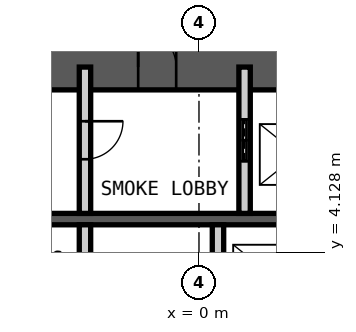
"""IFC4 building model, lengths in metres.
Left out: names, types, materials, properties, quantities, classifications, styles, units other than length and angle.
Written with IfcOpenShell. Run it as: python <this file> out.ifc"""

import sys

from ifc_helpers import new_model, si_unit, direction, frame, frame_2d, origin, place, context, subcontext, project, spatial, rectangle, extrude, element, fill, save


model = new_model("IFC4")
c1 = context("Model", 3, precision=1e-05, world=origin(), true_north=direction((0.0, 1.0)))
c2 = subcontext(c1, "Body", "Model", "MODEL_VIEW")
j1 = project(units=[si_unit("LENGTHUNIT", "METRE"), si_unit("PLANEANGLEUNIT", "RADIAN")], contexts=[c1])
p1 = place(None, origin())
s1 = spatial("IfcSite", under=j1, at=p1, CompositionType="ELEMENT")
p2 = place(p1, origin())
s2 = spatial("IfcBuilding", under=s1, at=p2, CompositionType="ELEMENT")
p3 = place(p2, frame((0.0, 0.0, 256.0)))
s3 = spatial("IfcBuildingStorey", under=s2, at=p3, CompositionType="ELEMENT", Elevation=256.0)
p4 = place(p3, frame((-12.0, 9.0, 0.0), z_axis=(0.0, 0.0, 1.0), x_axis=(1.0, 0.0, 0.0)))
e1 = element("IfcWall", 1, at=p4, inside=s3, PredefinedType="SHEAR", context=c2, shape_type="SweptSolid", body=[
    extrude(rectangle(XDim=24.0, YDim=1.2, at=frame_2d((12.0, 0.0))), origin(), (0.0, 0.0, 1.0), 6.0),
])
p5 = place(p4, frame((10.4, 0.0, 0.0)))
e2 = element("IfcOpeningElement", 2, at=p5, cuts=e1, PredefinedType="OPENING", context=c2, shape_type="SweptSolid", body=[
    extrude(rectangle(XDim=1.0, YDim=2.1, at=frame_2d((0.5, 1.05))), frame((0.0, 0.61, 0.0), z_axis=(0.0, -1.0, 0.0), x_axis=(1.0, 0.0, 0.0)), (0.0, 0.0, 1.0), 1.22),
])
p6 = place(p4, frame((17.6, 0.0, 0.0)))
e3 = element("IfcOpeningElement", 3, at=p6, cuts=e1, PredefinedType="OPENING", context=c2, shape_type="SweptSolid", body=[
    extrude(rectangle(XDim=0.9, YDim=2.1, at=frame_2d((0.45, 1.05))), frame((0.0, 0.61, 0.0), z_axis=(0.0, -1.0, 0.0), x_axis=(1.0, 0.0, 0.0)), (0.0, 0.0, 1.0), 1.22),
])
p7 = place(p4, frame((21.9, 0.0, 0.0)))
e4 = element("IfcOpeningElement", 4, at=p7, cuts=e1, PredefinedType="OPENING", context=c2, shape_type="SweptSolid", body=[
    extrude(rectangle(XDim=0.9, YDim=2.1, at=frame_2d((0.45, 1.05))), frame((0.0, 0.61, 0.0), z_axis=(0.0, -1.0, 0.0), x_axis=(1.0, 0.0, 0.0)), (0.0, 0.0, 1.0), 1.22),
])
p8 = place(p3, frame((-12.0, 5.0, 0.0), z_axis=(0.0, 0.0, 1.0), x_axis=(1.0, 0.0, 0.0)))
e5 = element("IfcWall", 5, at=p8, inside=s3, PredefinedType="SHEAR", context=c2, shape_type="SweptSolid", body=[
    extrude(rectangle(XDim=24.0, YDim=0.3, at=frame_2d((12.0, 0.0))), origin(), (0.0, 0.0, 1.0), 6.0),
])
p9 = place(p3, frame((-3.0, 5.15, 0.0), z_axis=(0.0, 0.0, 1.0), x_axis=(0.0, 1.0, 0.0)))
e6 = element("IfcWall", 6, at=p9, inside=s3, PredefinedType="PARTITIONING", context=c2, shape_type="SweptSolid", body=[
    extrude(rectangle(XDim=3.85, YDim=0.3, at=frame_2d((1.925, 0.0))), origin(), (0.0, 0.0, 1.0), 5.78),
])
p10 = place(p9, frame((1.425, 0.0, 0.0)))
e7 = element("IfcOpeningElement", 7, at=p10, cuts=e6, PredefinedType="OPENING", context=c2, shape_type="SweptSolid", body=[
    extrude(rectangle(XDim=1.0, YDim=2.1, at=frame_2d((0.5, 1.05))), frame((0.0, 0.16, 0.0), z_axis=(0.0, -1.0, 0.0), x_axis=(1.0, 0.0, 0.0)), (0.0, 0.0, 1.0), 0.32),
])
p11 = place(p3, frame((1.2, 5.15, 0.0), z_axis=(0.0, 0.0, 1.0), x_axis=(0.0, 1.0, 0.0)))
e8 = element("IfcWall", 8, at=p11, inside=s3, PredefinedType="PARTITIONING", context=c2, shape_type="SweptSolid", body=[
    extrude(rectangle(XDim=3.85, YDim=0.3, at=frame_2d((1.925, 0.0))), origin(), (0.0, 0.0, 1.0), 5.78),
])
p12 = place(p11, frame((1.375, 0.0, 0.0)))
e9 = element("IfcOpeningElement", 9, at=p12, cuts=e8, PredefinedType="OPENING", context=c2, shape_type="SweptSolid", body=[
    extrude(rectangle(XDim=1.1, YDim=2.4, at=frame_2d((0.55, 1.2))), frame((0.0, 0.16, 0.0), z_axis=(0.0, -1.0, 0.0), x_axis=(1.0, 0.0, 0.0)), (0.0, 0.0, 1.0), 0.32),
])
for number, where, z_axis, x_axis in (
    (10, (-3.0, 2.2, 0.0), (0.0, 0.0, 1.0), (0.0, 1.0, 0.0)),
    (11, (0.5, 2.2, 0.0), (0.0, 0.0, 1.0), (0.0, 1.0, 0.0)),
):
    element("IfcWall", number, at=place(p3, frame(where, z_axis=z_axis, x_axis=x_axis)), inside=s3, PredefinedType="PARTITIONING", context=c2, shape_type="SweptSolid", body=[
        extrude(rectangle(XDim=2.65, YDim=0.3, at=frame_2d((1.325, 0.0))), origin(), (0.0, 0.0, 1.0), 5.78),
    ])
p13 = place(p5, origin())
e12 = element("IfcDoor", 12, at=p13, inside=s3, OperationType="SINGLE_SWING_RIGHT", PredefinedType="DOOR", context=c2, shape_type="SweptSolid", body=[
    extrude(rectangle(XDim=1.0, YDim=2.1, at=frame_2d((0.5, 1.05))), frame((0.0, 0.025, 0.0), z_axis=(0.0, -1.0, 0.0), x_axis=(1.0, 0.0, 0.0)), (0.0, 0.0, 1.0), 0.05),
])
fill(e2, e12)
p14 = place(p10, origin())
e13 = element("IfcDoor", 13, at=p14, inside=s3, OperationType="SINGLE_SWING_RIGHT", PredefinedType="DOOR", context=c2, shape_type="SweptSolid", body=[
    extrude(rectangle(XDim=1.0, YDim=2.1, at=frame_2d((0.5, 1.05))), frame((0.0, 0.025, 0.0), z_axis=(0.0, -1.0, 0.0), x_axis=(1.0, 0.0, 0.0)), (0.0, 0.0, 1.0), 0.05),
])
fill(e7, e13)
p15 = place(p12, origin())
e14 = element("IfcDoor", 14, at=p15, inside=s3, OperationType="DOUBLE_DOOR_SLIDING", PredefinedType="DOOR", context=c2, shape_type="SweptSolid", body=[
    extrude(rectangle(XDim=1.1, YDim=2.4, at=frame_2d((0.55, 1.2))), frame((0.0, 0.025, 0.0), z_axis=(0.0, -1.0, 0.0), x_axis=(1.0, 0.0, 0.0)), (0.0, 0.0, 1.0), 0.05),
])
fill(e9, e14)
save(model, sys.argv[1])
